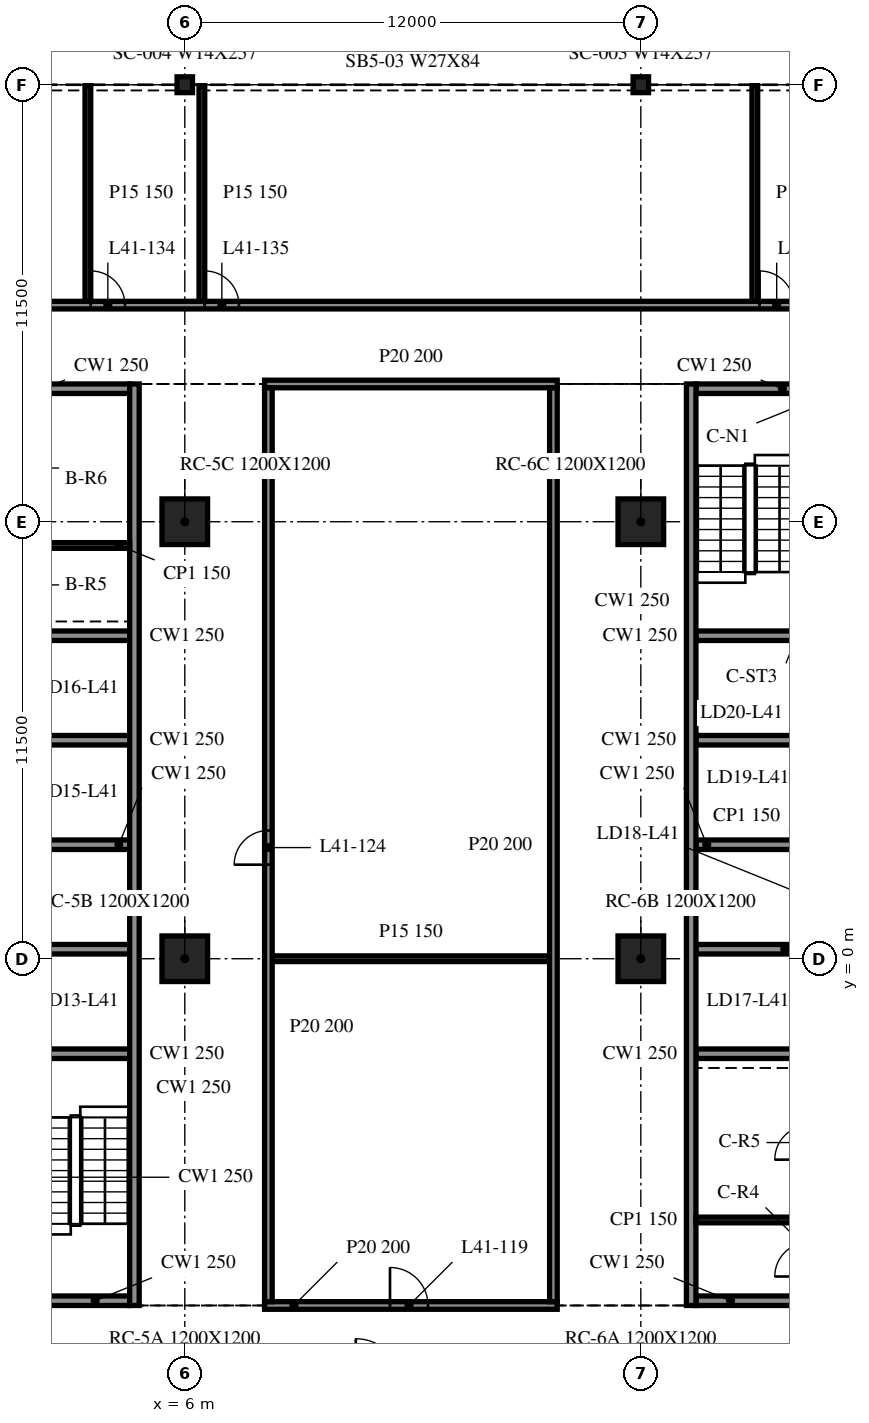
"""IFC4 building model, lengths in metres.
Left out: names, types, materials, properties, quantities, classifications, styles, units other than length and angle.
Written with IfcOpenShell. Run it as: python <this file> out.ifc"""

import sys

from ifc_helpers import new_model, si_unit, direction, frame, frame_2d, origin, origin_2d, place, context, subcontext, project, spatial, rectangle, i_section, extrude, element, fill, save


model = new_model("IFC4")
c1 = context("Model", 3, precision=1e-05, world=origin(), true_north=direction((0.0, 1.0)))
c2 = subcontext(c1, "Body", "Model", "MODEL_VIEW")
j1 = project(units=[si_unit("LENGTHUNIT", "METRE"), si_unit("PLANEANGLEUNIT", "RADIAN")], contexts=[c1])
p1 = place(None, origin())
s1 = spatial("IfcSite", under=j1, at=p1, CompositionType="ELEMENT")
p2 = place(p1, origin())
s2 = spatial("IfcBuilding", under=s1, at=p2, CompositionType="ELEMENT")
p3 = place(p2, frame((0.0, 0.0, 174.4)))
s3 = spatial("IfcBuildingStorey", under=s2, at=p3, CompositionType="ELEMENT", Elevation=174.4)
for number, where, z_axis, x_axis in (
    (1, (6.0, 0.0, -0.34), (0.0, 0.0, 1.0), (1.0, 0.0, 0.0)),
    (2, (6.0, 11.5, -0.34), (0.0, 0.0, 1.0), (1.0, 0.0, 0.0)),
    (3, (18.0, 0.0, -0.34), (0.0, 0.0, 1.0), (1.0, 0.0, 0.0)),
    (4, (18.0, 11.5, -0.34), (0.0, 0.0, 1.0), (1.0, 0.0, 0.0)),
):
    element("IfcColumn", number, at=place(p3, frame(where, z_axis=z_axis, x_axis=x_axis)), inside=s3, PredefinedType="COLUMN", context=c2, shape_type="SweptSolid", body=[
        extrude(rectangle(XDim=1.2, YDim=1.2, at=origin_2d()), origin(), (0.0, 0.0, 1.0), 3.8),
    ])
for number, where, z_axis, x_axis in (
    (5, (18.0, 23.0, -0.34), (0.0, 0.0, 1.0), (1.0, 0.0, 0.0)),
    (6, (6.0, 23.0, -0.34), (0.0, 0.0, 1.0), (1.0, 0.0, 0.0)),
):
    element("IfcColumn", number, at=place(p3, frame(where, z_axis=z_axis, x_axis=x_axis)), inside=s3, PredefinedType="COLUMN", context=c2, shape_type="SweptSolid", body=[
        extrude(i_section(OverallWidth=0.406, OverallDepth=0.417, WebThickness=0.03, FlangeThickness=0.048, at=origin_2d()), origin(), (0.0, 0.0, 1.0), 3.8),
    ])
p4 = place(p3, frame((4.675, -9.125, 0.0), z_axis=(0.0, 0.0, 1.0), x_axis=(0.0, 1.0, 0.0)))
e7 = element("IfcWall", 7, at=p4, inside=s3, PredefinedType="SOLIDWALL", context=c2, shape_type="SweptSolid", body=[
    extrude(rectangle(XDim=24.25, YDim=0.25, at=frame_2d((12.125, 0.0))), origin(), (0.0, 0.0, 1.0), 3.46),
])
p5 = place(p3, frame((4.55, -9.0, 0.0), z_axis=(0.0, 0.0, 1.0), x_axis=(-1.0, 0.0, 0.0)))
e8 = element("IfcWall", 8, at=p5, inside=s3, PredefinedType="SOLIDWALL", context=c2, shape_type="SweptSolid", body=[
    extrude(rectangle(XDim=9.1, YDim=0.25, at=frame_2d((4.55, 0.0))), origin(), (0.0, 0.0, 1.0), 3.46),
])
p6 = place(p5, frame((3.65, 0.0, 0.0)))
e9 = element("IfcOpeningElement", 9, at=p6, cuts=e8, PredefinedType="OPENING", context=c2, shape_type="SweptSolid", body=[
    extrude(rectangle(XDim=1.8, YDim=2.1, at=frame_2d((0.9, 1.05))), frame((0.0, 0.135, 0.0), z_axis=(0.0, -1.0, 0.0), x_axis=(1.0, 0.0, 0.0)), (0.0, 0.0, 1.0), 0.27),
])
p7 = place(p3, frame((-4.55, 15.0, 0.0), z_axis=(0.0, 0.0, 1.0), x_axis=(1.0, 0.0, 0.0)))
e10 = element("IfcWall", 10, at=p7, inside=s3, PredefinedType="SOLIDWALL", context=c2, shape_type="SweptSolid", body=[
    extrude(rectangle(XDim=9.1, YDim=0.25, at=frame_2d((4.55, 0.0))), origin(), (0.0, 0.0, 1.0), 3.46),
])
p8 = place(p7, frame((3.65, 0.0, 0.0)))
e11 = element("IfcOpeningElement", 11, at=p8, cuts=e10, PredefinedType="OPENING", context=c2, shape_type="SweptSolid", body=[
    extrude(rectangle(XDim=1.8, YDim=2.1, at=frame_2d((0.9, 1.05))), frame((0.0, 0.135, 0.0), z_axis=(0.0, -1.0, 0.0), x_axis=(1.0, 0.0, 0.0)), (0.0, 0.0, 1.0), 0.27),
])
for number, where, z_axis, x_axis in (
    (12, (1.7, -2.5, 0.0), (0.0, 0.0, 1.0), (1.0, 0.0, 0.0)),
    (13, (1.7, 0.25, 0.0), (0.0, 0.0, 1.0), (1.0, 0.0, 0.0)),
    (14, (1.7, 3.0, 0.0), (0.0, 0.0, 1.0), (1.0, 0.0, 0.0)),
    (15, (1.7, 5.75, 0.0), (0.0, 0.0, 1.0), (1.0, 0.0, 0.0)),
    (16, (1.7, 8.5, 0.0), (0.0, 0.0, 1.0), (1.0, 0.0, 0.0)),
):
    element("IfcWall", number, at=place(p3, frame(where, z_axis=z_axis, x_axis=x_axis)), inside=s3, PredefinedType="SOLIDWALL", context=c2, shape_type="SweptSolid", body=[
        extrude(rectangle(XDim=2.85, YDim=0.25, at=frame_2d((1.425, 0.0))), origin(), (0.0, 0.0, 1.0), 3.46),
    ])
p9 = place(p3, frame((1.7, 10.875, 0.0), z_axis=(0.0, 0.0, 1.0), x_axis=(1.0, 0.0, 0.0)))
e17 = element("IfcWall", 17, at=p9, inside=s3, PredefinedType="PARTITIONING", context=c2, shape_type="SweptSolid", body=[
    extrude(rectangle(XDim=2.85, YDim=0.15, at=frame_2d((1.425, 0.0))), origin(), (0.0, 0.0, 1.0), 3.46),
])
p10 = place(p3, frame((19.325, 15.125, 0.0), z_axis=(0.0, 0.0, 1.0), x_axis=(0.0, -1.0, 0.0)))
e18 = element("IfcWall", 18, at=p10, inside=s3, PredefinedType="SOLIDWALL", context=c2, shape_type="SweptSolid", body=[
    extrude(rectangle(XDim=24.25, YDim=0.25, at=frame_2d((12.125, 0.0))), origin(), (0.0, 0.0, 1.0), 3.46),
])
p11 = place(p3, frame((28.55, -9.0, 0.0), z_axis=(0.0, 0.0, 1.0), x_axis=(-1.0, 0.0, 0.0)))
e19 = element("IfcWall", 19, at=p11, inside=s3, PredefinedType="SOLIDWALL", context=c2, shape_type="SweptSolid", body=[
    extrude(rectangle(XDim=9.1, YDim=0.25, at=frame_2d((4.55, 0.0))), origin(), (0.0, 0.0, 1.0), 3.46),
])
p12 = place(p11, frame((3.65, 0.0, 0.0)))
e20 = element("IfcOpeningElement", 20, at=p12, cuts=e19, PredefinedType="OPENING", context=c2, shape_type="SweptSolid", body=[
    extrude(rectangle(XDim=1.8, YDim=2.1, at=frame_2d((0.9, 1.05))), frame((0.0, 0.135, 0.0), z_axis=(0.0, -1.0, 0.0), x_axis=(1.0, 0.0, 0.0)), (0.0, 0.0, 1.0), 0.27),
])
p13 = place(p3, frame((19.45, 15.0, 0.0), z_axis=(0.0, 0.0, 1.0), x_axis=(1.0, 0.0, 0.0)))
e21 = element("IfcWall", 21, at=p13, inside=s3, PredefinedType="SOLIDWALL", context=c2, shape_type="SweptSolid", body=[
    extrude(rectangle(XDim=9.1, YDim=0.25, at=frame_2d((4.55, 0.0))), origin(), (0.0, 0.0, 1.0), 3.46),
])
p14 = place(p13, frame((3.65, 0.0, 0.0)))
e22 = element("IfcOpeningElement", 22, at=p14, cuts=e21, PredefinedType="OPENING", context=c2, shape_type="SweptSolid", body=[
    extrude(rectangle(XDim=1.8, YDim=2.1, at=frame_2d((0.9, 1.05))), frame((0.0, 0.135, 0.0), z_axis=(0.0, -1.0, 0.0), x_axis=(1.0, 0.0, 0.0)), (0.0, 0.0, 1.0), 0.27),
])
for number, where, z_axis, x_axis in (
    (23, (19.45, -2.5, 0.0), (0.0, 0.0, 1.0), (1.0, 0.0, 0.0)),
    (24, (19.45, 0.25, 0.0), (0.0, 0.0, 1.0), (1.0, 0.0, 0.0)),
    (25, (19.45, 3.0, 0.0), (0.0, 0.0, 1.0), (1.0, 0.0, 0.0)),
    (26, (19.45, 5.75, 0.0), (0.0, 0.0, 1.0), (1.0, 0.0, 0.0)),
    (27, (19.45, 8.5, 0.0), (0.0, 0.0, 1.0), (1.0, 0.0, 0.0)),
):
    element("IfcWall", number, at=place(p3, frame(where, z_axis=z_axis, x_axis=x_axis)), inside=s3, PredefinedType="SOLIDWALL", context=c2, shape_type="SweptSolid", body=[
        extrude(rectangle(XDim=2.85, YDim=0.25, at=frame_2d((1.425, 0.0))), origin(), (0.0, 0.0, 1.0), 3.46),
    ])
p15 = place(p3, frame((19.45, -6.875, 0.0), z_axis=(0.0, 0.0, 1.0), x_axis=(1.0, 0.0, 0.0)))
e28 = element("IfcWall", 28, at=p15, inside=s3, PredefinedType="PARTITIONING", context=c2, shape_type="SweptSolid", body=[
    extrude(rectangle(XDim=2.85, YDim=0.15, at=frame_2d((1.425, 0.0))), origin(), (0.0, 0.0, 1.0), 3.46),
])
p16 = place(p3, frame((8.1, -9.125, 0.0), z_axis=(0.0, 0.0, 1.0), x_axis=(1.0, 0.0, 0.0)))
e29 = element("IfcWall", 29, at=p16, inside=s3, PredefinedType="PARTITIONING", context=c2, shape_type="SweptSolid", body=[
    extrude(rectangle(XDim=7.7, YDim=0.2, at=frame_2d((3.85, 0.0))), origin(), (0.0, 0.0, 1.0), 3.46),
])
p17 = place(p16, frame((3.3, 0.0, 0.0)))
e30 = element("IfcOpeningElement", 30, at=p17, cuts=e29, PredefinedType="OPENING", context=c2, shape_type="SweptSolid", body=[
    extrude(rectangle(XDim=1.0, YDim=2.1, at=frame_2d((0.5, 1.05))), frame((0.0, 0.11, 0.0), z_axis=(0.0, -1.0, 0.0), x_axis=(1.0, 0.0, 0.0)), (0.0, 0.0, 1.0), 0.22),
])
p18 = place(p3, frame((8.3, 0.0, 0.0), z_axis=(0.0, 0.0, 1.0), x_axis=(1.0, 0.0, 0.0)))
e31 = element("IfcWall", 31, at=p18, inside=s3, PredefinedType="PARTITIONING", context=c2, shape_type="SweptSolid", body=[
    extrude(rectangle(XDim=7.3, YDim=0.15, at=frame_2d((3.65, 0.0))), origin(), (0.0, 0.0, 1.0), 3.46),
])
p19 = place(p3, frame((8.1, 15.125, 0.0), z_axis=(0.0, 0.0, 1.0), x_axis=(1.0, 0.0, 0.0)))
e32 = element("IfcWall", 32, at=p19, inside=s3, PredefinedType="PARTITIONING", context=c2, shape_type="SweptSolid", body=[
    extrude(rectangle(XDim=7.7, YDim=0.2, at=frame_2d((3.85, 0.0))), origin(), (0.0, 0.0, 1.0), 3.46),
])
p20 = place(p3, frame((-47.975, 17.2, 0.0), z_axis=(0.0, 0.0, 1.0), x_axis=(1.0, 0.0, 0.0)))
e33 = element("IfcWall", 33, at=p20, inside=s3, PredefinedType="PARTITIONING", context=c2, shape_type="SweptSolid", body=[
    extrude(rectangle(XDim=95.95, YDim=0.2, at=frame_2d((47.975, 0.0))), origin(), (0.0, 0.0, 1.0), 3.46),
])
p21 = place(p20, frame((13.7, 0.0, 0.0)))
e34 = element("IfcOpeningElement", 34, at=p21, cuts=e33, PredefinedType="OPENING", context=c2, shape_type="SweptSolid", body=[
    extrude(rectangle(XDim=0.9, YDim=2.1, at=frame_2d((0.45, 1.05))), frame((0.0, 0.11, 0.0), z_axis=(0.0, -1.0, 0.0), x_axis=(1.0, 0.0, 0.0)), (0.0, 0.0, 1.0), 0.22),
])
p22 = place(p20, frame((19.7, 0.0, 0.0)))
e35 = element("IfcOpeningElement", 35, at=p22, cuts=e33, PredefinedType="OPENING", context=c2, shape_type="SweptSolid", body=[
    extrude(rectangle(XDim=0.9, YDim=2.1, at=frame_2d((0.45, 1.05))), frame((0.0, 0.11, 0.0), z_axis=(0.0, -1.0, 0.0), x_axis=(1.0, 0.0, 0.0)), (0.0, 0.0, 1.0), 0.22),
])
p23 = place(p20, frame((23.1, 0.0, 0.0)))
e36 = element("IfcOpeningElement", 36, at=p23, cuts=e33, PredefinedType="OPENING", context=c2, shape_type="SweptSolid", body=[
    extrude(rectangle(XDim=0.9, YDim=2.1, at=frame_2d((0.45, 1.05))), frame((0.0, 0.11, 0.0), z_axis=(0.0, -1.0, 0.0), x_axis=(1.0, 0.0, 0.0)), (0.0, 0.0, 1.0), 0.22),
])
p24 = place(p20, frame((25.7, 0.0, 0.0)))
e37 = element("IfcOpeningElement", 37, at=p24, cuts=e33, PredefinedType="OPENING", context=c2, shape_type="SweptSolid", body=[
    extrude(rectangle(XDim=0.9, YDim=2.1, at=frame_2d((0.45, 1.05))), frame((0.0, 0.11, 0.0), z_axis=(0.0, -1.0, 0.0), x_axis=(1.0, 0.0, 0.0)), (0.0, 0.0, 1.0), 0.22),
])
p25 = place(p20, frame((40.7, 0.0, 0.0)))
e38 = element("IfcOpeningElement", 38, at=p25, cuts=e33, PredefinedType="OPENING", context=c2, shape_type="SweptSolid", body=[
    extrude(rectangle(XDim=0.9, YDim=2.1, at=frame_2d((0.45, 1.05))), frame((0.0, 0.11, 0.0), z_axis=(0.0, -1.0, 0.0), x_axis=(1.0, 0.0, 0.0)), (0.0, 0.0, 1.0), 0.22),
])
p26 = place(p20, frame((46.7, 0.0, 0.0)))
e39 = element("IfcOpeningElement", 39, at=p26, cuts=e33, PredefinedType="OPENING", context=c2, shape_type="SweptSolid", body=[
    extrude(rectangle(XDim=0.9, YDim=2.1, at=frame_2d((0.45, 1.05))), frame((0.0, 0.11, 0.0), z_axis=(0.0, -1.0, 0.0), x_axis=(1.0, 0.0, 0.0)), (0.0, 0.0, 1.0), 0.22),
])
p27 = place(p20, frame((48.1, 0.0, 0.0)))
e40 = element("IfcOpeningElement", 40, at=p27, cuts=e33, PredefinedType="OPENING", context=c2, shape_type="SweptSolid", body=[
    extrude(rectangle(XDim=0.9, YDim=2.1, at=frame_2d((0.45, 1.05))), frame((0.0, 0.11, 0.0), z_axis=(0.0, -1.0, 0.0), x_axis=(1.0, 0.0, 0.0)), (0.0, 0.0, 1.0), 0.22),
])
p28 = place(p20, frame((51.5, 0.0, 0.0)))
e41 = element("IfcOpeningElement", 41, at=p28, cuts=e33, PredefinedType="OPENING", context=c2, shape_type="SweptSolid", body=[
    extrude(rectangle(XDim=0.9, YDim=2.1, at=frame_2d((0.45, 1.05))), frame((0.0, 0.11, 0.0), z_axis=(0.0, -1.0, 0.0), x_axis=(1.0, 0.0, 0.0)), (0.0, 0.0, 1.0), 0.22),
])
p29 = place(p20, frame((54.5, 0.0, 0.0)))
e42 = element("IfcOpeningElement", 42, at=p29, cuts=e33, PredefinedType="OPENING", context=c2, shape_type="SweptSolid", body=[
    extrude(rectangle(XDim=0.9, YDim=2.1, at=frame_2d((0.45, 1.05))), frame((0.0, 0.11, 0.0), z_axis=(0.0, -1.0, 0.0), x_axis=(1.0, 0.0, 0.0)), (0.0, 0.0, 1.0), 0.22),
])
p30 = place(p20, frame((69.1, 0.0, 0.0)))
e43 = element("IfcOpeningElement", 43, at=p30, cuts=e33, PredefinedType="OPENING", context=c2, shape_type="SweptSolid", body=[
    extrude(rectangle(XDim=0.9, YDim=2.1, at=frame_2d((0.45, 1.05))), frame((0.0, 0.11, 0.0), z_axis=(0.0, -1.0, 0.0), x_axis=(1.0, 0.0, 0.0)), (0.0, 0.0, 1.0), 0.22),
])
p31 = place(p20, frame((75.1, 0.0, 0.0)))
e44 = element("IfcOpeningElement", 44, at=p31, cuts=e33, PredefinedType="OPENING", context=c2, shape_type="SweptSolid", body=[
    extrude(rectangle(XDim=0.9, YDim=2.1, at=frame_2d((0.45, 1.05))), frame((0.0, 0.11, 0.0), z_axis=(0.0, -1.0, 0.0), x_axis=(1.0, 0.0, 0.0)), (0.0, 0.0, 1.0), 0.22),
])
p32 = place(p20, frame((78.1, 0.0, 0.0)))
e45 = element("IfcOpeningElement", 45, at=p32, cuts=e33, PredefinedType="OPENING", context=c2, shape_type="SweptSolid", body=[
    extrude(rectangle(XDim=0.9, YDim=2.1, at=frame_2d((0.45, 1.05))), frame((0.0, 0.11, 0.0), z_axis=(0.0, -1.0, 0.0), x_axis=(1.0, 0.0, 0.0)), (0.0, 0.0, 1.0), 0.22),
])
p33 = place(p20, frame((81.1, 0.0, 0.0)))
e46 = element("IfcOpeningElement", 46, at=p33, cuts=e33, PredefinedType="OPENING", context=c2, shape_type="SweptSolid", body=[
    extrude(rectangle(XDim=0.9, YDim=2.1, at=frame_2d((0.45, 1.05))), frame((0.0, 0.11, 0.0), z_axis=(0.0, -1.0, 0.0), x_axis=(1.0, 0.0, 0.0)), (0.0, 0.0, 1.0), 0.22),
])
for number, where, z_axis, x_axis in (
    (47, (3.45, 17.3, 0.0), (0.0, 0.0, 1.0), (0.0, 1.0, 0.0)),
    (48, (6.45, 17.3, 0.0), (0.0, 0.0, 1.0), (0.0, 1.0, 0.0)),
):
    element("IfcWall", number, at=place(p3, frame(where, z_axis=z_axis, x_axis=x_axis)), inside=s3, PredefinedType="PARTITIONING", context=c2, shape_type="SweptSolid", body=[
        extrude(rectangle(XDim=5.675, YDim=0.15, at=frame_2d((2.837, 0.0))), origin(), (0.0, 0.0, 1.0), 3.46),
    ])
p34 = place(p3, frame((8.2, -9.025, 0.0), z_axis=(0.0, 0.0, 1.0), x_axis=(0.0, 1.0, 0.0)))
e49 = element("IfcWall", 49, at=p34, inside=s3, PredefinedType="PARTITIONING", context=c2, shape_type="SweptSolid", body=[
    extrude(rectangle(XDim=24.05, YDim=0.2, at=frame_2d((12.025, 0.0))), origin(), (0.0, 0.0, 1.0), 3.46),
])
p35 = place(p34, frame((11.5, 0.0, 0.0)))
e50 = element("IfcOpeningElement", 50, at=p35, cuts=e49, PredefinedType="OPENING", context=c2, shape_type="SweptSolid", body=[
    extrude(rectangle(XDim=0.9, YDim=2.1, at=frame_2d((0.45, 1.05))), frame((0.0, 0.11, 0.0), z_axis=(0.0, -1.0, 0.0), x_axis=(1.0, 0.0, 0.0)), (0.0, 0.0, 1.0), 0.22),
])
p36 = place(p3, frame((15.7, -9.025, 0.0), z_axis=(0.0, 0.0, 1.0), x_axis=(0.0, 1.0, 0.0)))
e51 = element("IfcWall", 51, at=p36, inside=s3, PredefinedType="PARTITIONING", context=c2, shape_type="SweptSolid", body=[
    extrude(rectangle(XDim=24.05, YDim=0.2, at=frame_2d((12.025, 0.0))), origin(), (0.0, 0.0, 1.0), 3.46),
])
p37 = place(p3, frame((21.0, 17.3, 0.0), z_axis=(0.0, 0.0, 1.0), x_axis=(0.0, 1.0, 0.0)))
e52 = element("IfcWall", 52, at=p37, inside=s3, PredefinedType="PARTITIONING", context=c2, shape_type="SweptSolid", body=[
    extrude(rectangle(XDim=5.675, YDim=0.15, at=frame_2d((2.837, 0.0))), origin(), (0.0, 0.0, 1.0), 3.46),
])
p38 = place(p17, origin())
e53 = element("IfcDoor", 53, at=p38, inside=s3, OperationType="SINGLE_SWING_LEFT", PredefinedType="DOOR", context=c2, shape_type="SweptSolid", body=[
    extrude(rectangle(XDim=1.0, YDim=2.1, at=frame_2d((0.5, 1.05))), frame((0.0, 0.025, 0.0), z_axis=(0.0, -1.0, 0.0), x_axis=(1.0, 0.0, 0.0)), (0.0, 0.0, 1.0), 0.05),
])
fill(e30, e53)
p39 = place(p35, origin())
e54 = element("IfcDoor", 54, at=p39, inside=s3, OperationType="SINGLE_SWING_RIGHT", PredefinedType="DOOR", context=c2, shape_type="SweptSolid", body=[
    extrude(rectangle(XDim=0.9, YDim=2.1, at=frame_2d((0.45, 1.05))), frame((0.0, 0.025, 0.0), z_axis=(0.0, -1.0, 0.0), x_axis=(1.0, 0.0, 0.0)), (0.0, 0.0, 1.0), 0.05),
])
fill(e50, e54)
p40 = place(p28, origin())
e55 = element("IfcDoor", 55, at=p40, inside=s3, OperationType="SINGLE_SWING_RIGHT", PredefinedType="DOOR", context=c2, shape_type="SweptSolid", body=[
    extrude(rectangle(XDim=0.9, YDim=2.1, at=frame_2d((0.45, 1.05))), frame((0.0, 0.025, 0.0), z_axis=(0.0, -1.0, 0.0), x_axis=(1.0, 0.0, 0.0)), (0.0, 0.0, 1.0), 0.05),
])
fill(e41, e55)
p41 = place(p29, origin())
e56 = element("IfcDoor", 56, at=p41, inside=s3, OperationType="SINGLE_SWING_RIGHT", PredefinedType="DOOR", context=c2, shape_type="SweptSolid", body=[
    extrude(rectangle(XDim=0.9, YDim=2.1, at=frame_2d((0.45, 1.05))), frame((0.0, 0.025, 0.0), z_axis=(0.0, -1.0, 0.0), x_axis=(1.0, 0.0, 0.0)), (0.0, 0.0, 1.0), 0.05),
])
fill(e42, e56)
p42 = place(p30, origin())
e57 = element("IfcDoor", 57, at=p42, inside=s3, OperationType="SINGLE_SWING_RIGHT", PredefinedType="DOOR", context=c2, shape_type="SweptSolid", body=[
    extrude(rectangle(XDim=0.9, YDim=2.1, at=frame_2d((0.45, 1.05))), frame((0.0, 0.025, 0.0), z_axis=(0.0, -1.0, 0.0), x_axis=(1.0, 0.0, 0.0)), (0.0, 0.0, 1.0), 0.05),
])
fill(e43, e57)
save(model, sys.argv[1])
